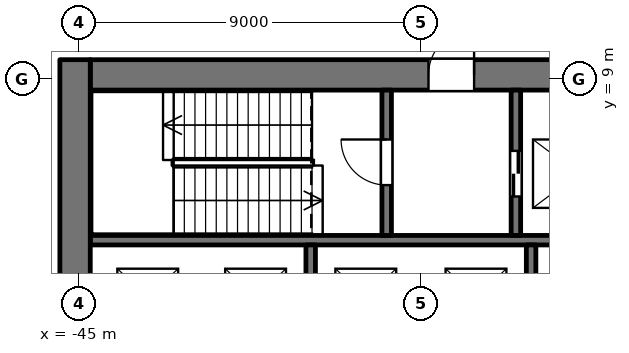
"""IFC4 building model, lengths in metres.
Left out: names, types, materials, properties, quantities, classifications, styles, units other than length and angle.
Written with IfcOpenShell. Run it as: python <this file> out.ifc"""

import sys

from ifc_helpers import new_model, si_unit, direction, frame, frame_2d, origin, place, context, subcontext, project, spatial, rectangle, extrude, element, fill, save


model = new_model("IFC4")
c1 = context("Model", 3, precision=1e-05, world=origin(), true_north=direction((0.0, 1.0)))
c2 = subcontext(c1, "Body", "Model", "MODEL_VIEW")
j1 = project(units=[si_unit("LENGTHUNIT", "METRE"), si_unit("PLANEANGLEUNIT", "RADIAN")], contexts=[c1])
p1 = place(None, origin())
s1 = spatial("IfcSite", under=j1, at=p1, CompositionType="ELEMENT")
p2 = place(p1, origin())
s2 = spatial("IfcBuilding", under=s1, at=p2, CompositionType="ELEMENT")
p3 = place(p2, frame((0.0, 0.0, 18.0)))
s3 = spatial("IfcBuildingStorey", under=s2, at=p3, CompositionType="ELEMENT", Elevation=18.0)
p4 = place(p3, frame((-44.7, 4.75, 0.0), z_axis=(0.0, 0.0, 1.0), x_axis=(1.0, 0.0, 0.0)))
e1 = element("IfcWall", 1, at=p4, inside=s3, PredefinedType="SHEAR", context=c2, shape_type="SweptSolid", body=[
    extrude(rectangle(XDim=17.4, YDim=0.25, at=frame_2d((8.7, 0.0))), origin(), (0.0, 0.0, 1.0), 4.5),
])
p5 = place(p3, frame((-44.7, 9.1, 0.0), z_axis=(0.0, 0.0, 1.0), x_axis=(1.0, 0.0, 0.0)))
e2 = element("IfcWall", 2, at=p5, inside=s3, PredefinedType="SHEAR", context=c2, shape_type="SweptSolid", body=[
    extrude(rectangle(XDim=17.4, YDim=0.8, at=frame_2d((8.7, 0.0))), origin(), (0.0, 0.0, 1.0), 4.5),
])
p6 = place(p5, frame((8.9, 0.0, 0.0)))
e3 = element("IfcOpeningElement", 3, at=p6, cuts=e2, PredefinedType="OPENING", context=c2, shape_type="SweptSolid", body=[
    extrude(rectangle(XDim=1.2, YDim=2.1, at=frame_2d((0.6, 1.05))), frame((0.0, 0.41, 0.0), z_axis=(0.0, -1.0, 0.0), x_axis=(1.0, 0.0, 0.0)), (0.0, 0.0, 1.0), 0.82),
])
p7 = place(p5, frame((14.7, 0.0, 0.0)))
e4 = element("IfcOpeningElement", 4, at=p7, cuts=e2, PredefinedType="OPENING", context=c2, shape_type="SweptSolid", body=[
    extrude(rectangle(XDim=0.9, YDim=2.1, at=frame_2d((0.45, 1.05))), frame((0.0, 0.41, 0.0), z_axis=(0.0, -1.0, 0.0), x_axis=(1.0, 0.0, 0.0)), (0.0, 0.0, 1.0), 0.82),
])
p8 = place(p5, frame((16.2, 0.0, 0.0)))
e5 = element("IfcOpeningElement", 5, at=p8, cuts=e2, PredefinedType="OPENING", context=c2, shape_type="SweptSolid", body=[
    extrude(rectangle(XDim=0.9, YDim=2.1, at=frame_2d((0.45, 1.05))), frame((0.0, 0.41, 0.0), z_axis=(0.0, -1.0, 0.0), x_axis=(1.0, 0.0, 0.0)), (0.0, 0.0, 1.0), 0.82),
])
p9 = place(p3, frame((-45.1, -9.5, 0.0), z_axis=(0.0, 0.0, 1.0), x_axis=(0.0, 1.0, 0.0)))
e6 = element("IfcWall", 6, at=p9, inside=s3, PredefinedType="SHEAR", context=c2, shape_type="SweptSolid", body=[
    extrude(rectangle(XDim=19.0, YDim=0.8, at=frame_2d((9.5, 0.0))), origin(), (0.0, 0.0, 1.0), 4.5),
])
p10 = place(p9, frame((8.3, 0.0, 0.0)))
e7 = element("IfcOpeningElement", 7, at=p10, cuts=e6, PredefinedType="OPENING", context=c2, shape_type="SweptSolid", body=[
    extrude(rectangle(XDim=2.4, YDim=2.1, at=frame_2d((1.2, 1.05))), frame((0.0, 0.41, 0.0), z_axis=(0.0, -1.0, 0.0), x_axis=(1.0, 0.0, 0.0)), (0.0, 0.0, 1.0), 0.82),
])
p11 = place(p3, frame((-38.9, 2.0, 0.0), z_axis=(0.0, 0.0, 1.0), x_axis=(0.0, 1.0, 0.0)))
e8 = element("IfcWall", 8, at=p11, inside=s3, PredefinedType="SHEAR", context=c2, shape_type="SweptSolid", body=[
    extrude(rectangle(XDim=2.625, YDim=0.25, at=frame_2d((1.312, 0.0))), origin(), (0.0, 0.0, 1.0), 4.5),
])
p12 = place(p3, frame((-36.9, 4.875, 0.0), z_axis=(0.0, 0.0, 1.0), x_axis=(0.0, 1.0, 0.0)))
e9 = element("IfcWall", 9, at=p12, inside=s3, PredefinedType="SHEAR", context=c2, shape_type="SweptSolid", body=[
    extrude(rectangle(XDim=3.825, YDim=0.25, at=frame_2d((1.913, 0.0))), origin(), (0.0, 0.0, 1.0), 4.5),
])
p13 = place(p12, frame((1.325, 0.0, 0.0)))
e10 = element("IfcOpeningElement", 10, at=p13, cuts=e9, PredefinedType="OPENING", context=c2, shape_type="SweptSolid", body=[
    extrude(rectangle(XDim=1.2, YDim=2.1, at=frame_2d((0.6, 1.05))), frame((0.0, 0.135, 0.0), z_axis=(0.0, -1.0, 0.0), x_axis=(1.0, 0.0, 0.0)), (0.0, 0.0, 1.0), 0.27),
])
p14 = place(p3, frame((-33.5, 4.875, 0.0), z_axis=(0.0, 0.0, 1.0), x_axis=(0.0, 1.0, 0.0)))
e11 = element("IfcWall", 11, at=p14, inside=s3, PredefinedType="SHEAR", context=c2, shape_type="SweptSolid", body=[
    extrude(rectangle(XDim=3.825, YDim=0.25, at=frame_2d((1.913, 0.0))), origin(), (0.0, 0.0, 1.0), 4.5),
])
p15 = place(p14, frame((1.025, 0.0, 0.0)))
e12 = element("IfcOpeningElement", 12, at=p15, cuts=e11, PredefinedType="OPENING", context=c2, shape_type="SweptSolid", body=[
    extrude(rectangle(XDim=1.2, YDim=2.1, at=frame_2d((0.6, 1.05))), frame((0.0, 0.135, 0.0), z_axis=(0.0, -1.0, 0.0), x_axis=(1.0, 0.0, 0.0)), (0.0, 0.0, 1.0), 0.27),
])
p16 = place(p3, frame((-33.1, 2.0, 0.0), z_axis=(0.0, 0.0, 1.0), x_axis=(0.0, 1.0, 0.0)))
e13 = element("IfcWall", 13, at=p16, inside=s3, PredefinedType="SHEAR", context=c2, shape_type="SweptSolid", body=[
    extrude(rectangle(XDim=2.625, YDim=0.25, at=frame_2d((1.312, 0.0))), origin(), (0.0, 0.0, 1.0), 4.5),
])
p17 = place(p15, origin())
e14 = element("IfcDoor", 14, at=p17, inside=s3, OperationType="SLIDING_TO_LEFT", PredefinedType="DOOR", context=c2, shape_type="SweptSolid", body=[
    extrude(rectangle(XDim=1.2, YDim=2.1, at=frame_2d((0.6, 1.05))), frame((0.0, 0.025, 0.0), z_axis=(0.0, -1.0, 0.0), x_axis=(1.0, 0.0, 0.0)), (0.0, 0.0, 1.0), 0.05),
])
fill(e12, e14)
p18 = place(p13, origin())
e15 = element("IfcDoor", 15, at=p18, inside=s3, OperationType="SINGLE_SWING_RIGHT", PredefinedType="DOOR", context=c2, shape_type="SweptSolid", body=[
    extrude(rectangle(XDim=1.2, YDim=2.1, at=frame_2d((0.6, 1.05))), frame((0.0, 0.025, 0.0), z_axis=(0.0, -1.0, 0.0), x_axis=(1.0, 0.0, 0.0)), (0.0, 0.0, 1.0), 0.05),
])
fill(e10, e15)
p19 = place(p6, origin())
e16 = element("IfcDoor", 16, at=p19, inside=s3, OperationType="SINGLE_SWING_RIGHT", PredefinedType="DOOR", context=c2, shape_type="SweptSolid", body=[
    extrude(rectangle(XDim=1.2, YDim=2.1, at=frame_2d((0.6, 1.05))), frame((0.0, -0.225, 0.0), z_axis=(0.0, -1.0, 0.0), x_axis=(1.0, 0.0, 0.0)), (0.0, 0.0, 1.0), 0.05),
])
fill(e3, e16)
save(model, sys.argv[1])
